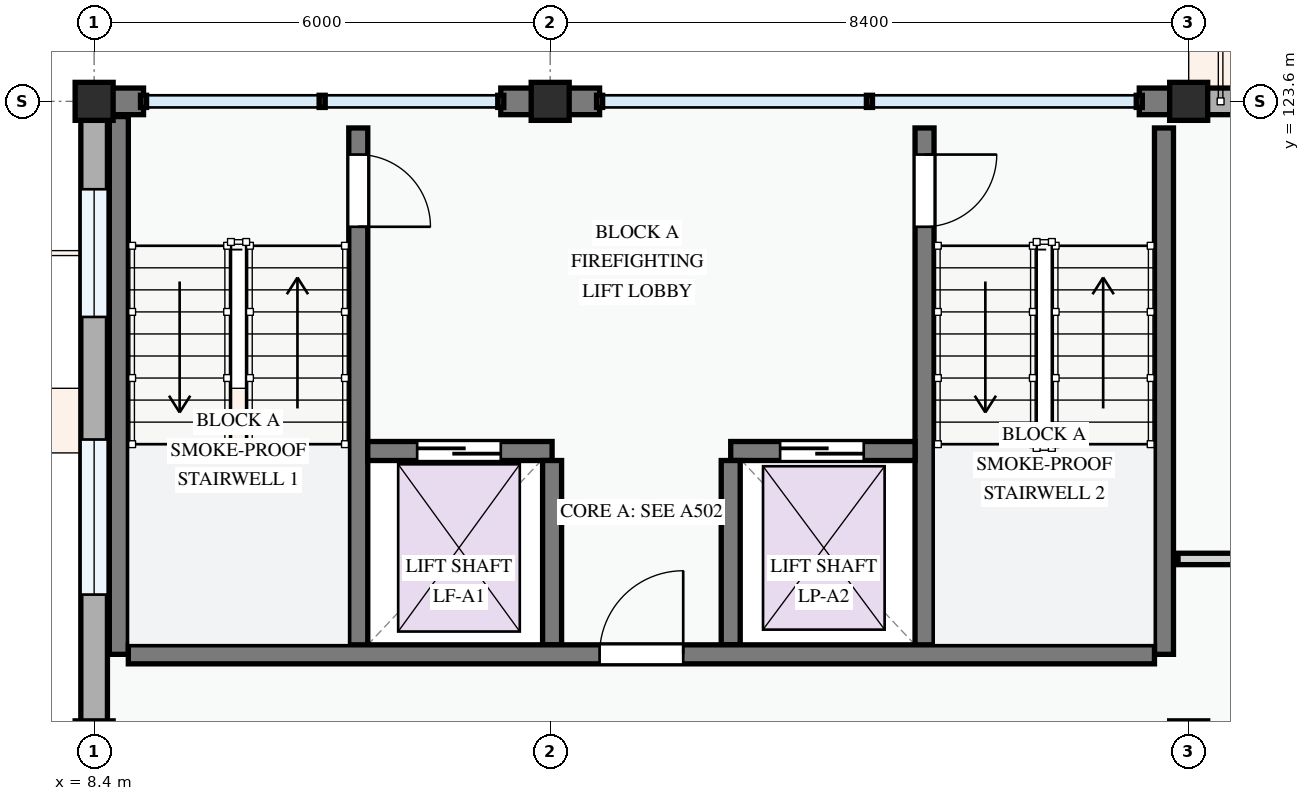
"""IFC4 building model, lengths in metres.
Left out: names, types, materials, properties, quantities, classifications, styles, units other than length and angle.
Written with IfcOpenShell. Run it as: python <this file> out.ifc"""

import sys

from ifc_helpers import new_model, si_unit, direction, frame, frame_2d, origin, origin_2d, place, context, subcontext, project, spatial, rectangle, extrude, element, fill, save


model = new_model("IFC4")
c1 = context("Model", 3, precision=1e-05, world=origin(), true_north=direction((0.0, 1.0)))
c2 = subcontext(c1, "Body", "Model", "MODEL_VIEW")
j1 = project(units=[si_unit("LENGTHUNIT", "METRE"), si_unit("PLANEANGLEUNIT", "RADIAN")], contexts=[c1])
p1 = place(None, origin())
s1 = spatial("IfcSite", under=j1, at=p1, CompositionType="ELEMENT")
p2 = place(p1, origin())
s2 = spatial("IfcBuilding", under=s1, at=p2, CompositionType="ELEMENT")
p3 = place(p2, frame((0.0, 0.0, 47.7)))
s3 = spatial("IfcBuildingStorey", under=s2, at=p3, CompositionType="ELEMENT", Elevation=47.7)
for number, where, z_axis, x_axis in (
    (1, (8.4, 123.6, 0.0), (0.0, 0.0, 1.0), (1.0, 0.0, 0.0)),
    (2, (14.4, 123.6, 0.0), (0.0, 0.0, 1.0), (1.0, 0.0, 0.0)),
    (3, (22.8, 123.6, 0.0), (0.0, 0.0, 1.0), (1.0, 0.0, 0.0)),
):
    element("IfcColumn", number, at=place(p3, frame(where, z_axis=z_axis, x_axis=x_axis)), inside=s3, PredefinedType="COLUMN", context=c2, shape_type="SweptSolid", body=[
        extrude(rectangle(XDim=0.5, YDim=0.5, at=origin_2d()), origin(), (0.0, 0.0, 1.0), 3.3),
    ])
p4 = place(p3, frame((28.8, 123.6, 0.0), z_axis=(0.0, 0.0, 1.0), x_axis=(-1.0, 0.0, 0.0)))
e4 = element("IfcWall", 4, at=p4, inside=s3, PredefinedType="STANDARD", context=c2, shape_type="SweptSolid", body=[
    extrude(rectangle(XDim=6.0, YDim=0.35, at=frame_2d((3.0, 0.0))), origin(), (0.0, 0.0, 1.0), 2.525),
])
p5 = place(p4, frame((0.62, 0.0, 0.0)))
e5 = element("IfcOpeningElement", 5, at=p5, cuts=e4, PredefinedType="OPENING", context=c2, shape_type="SweptSolid", body=[
    extrude(rectangle(XDim=1.1, YDim=2.15, at=frame_2d((0.55, 1.075))), frame((0.0, 0.185, 0.0), z_axis=(0.0, -1.0, 0.0), x_axis=(1.0, 0.0, 0.0)), (0.0, 0.0, 1.0), 0.37),
])
p6 = place(p4, frame((3.04, 0.0, 0.78)))
e6 = element("IfcOpeningElement", 6, at=p6, cuts=e4, PredefinedType="OPENING", context=c2, shape_type="SweptSolid", body=[
    extrude(rectangle(XDim=1.5, YDim=1.5, at=frame_2d((0.75, 0.75))), frame((0.0, 0.185, 0.0), z_axis=(0.0, -1.0, 0.0), x_axis=(1.0, 0.0, 0.0)), (0.0, 0.0, 1.0), 0.37),
])
for number, where, z_axis, x_axis in (
    (7, (22.8, 123.6, 0.0), (0.0, 0.0, 1.0), (-1.0, 0.0, 0.0)),
    (8, (15.05, 123.6, 0.0), (0.0, 0.0, 1.0), (-1.0, 0.0, 0.0)),
):
    element("IfcWall", number, at=place(p3, frame(where, z_axis=z_axis, x_axis=x_axis)), inside=s3, PredefinedType="STANDARD", context=c2, shape_type="SweptSolid", body=[
        extrude(rectangle(XDim=0.65, YDim=0.35, at=frame_2d((0.325, 0.0))), origin(), (0.0, 0.0, 1.0), 3.04),
    ])
p7 = place(p3, frame((14.4, 123.6, 0.0), z_axis=(0.0, 0.0, 1.0), x_axis=(-1.0, 0.0, 0.0)))
e9 = element("IfcWall", 9, at=p7, inside=s3, PredefinedType="STANDARD", context=c2, shape_type="SweptSolid", body=[
    extrude(rectangle(XDim=0.65, YDim=0.35, at=frame_2d((0.325, 0.0))), origin(), (0.0, 0.0, 1.0), 3.04),
])
p8 = place(p3, frame((9.05, 123.6, 0.0), z_axis=(0.0, 0.0, 1.0), x_axis=(-1.0, 0.0, 0.0)))
e10 = element("IfcWall", 10, at=p8, inside=s3, PredefinedType="STANDARD", context=c2, shape_type="SweptSolid", body=[
    extrude(rectangle(XDim=0.473, YDim=0.35, at=frame_2d((0.237, 0.0))), origin(), (0.0, 0.0, 1.0), 3.04),
])
p9 = place(p3, frame((8.4, 123.6, 0.0), z_axis=(0.0, 0.0, 1.0), x_axis=(0.0, -1.0, 0.0)))
e11 = element("IfcWall", 11, at=p9, inside=s3, PredefinedType="STANDARD", context=c2, shape_type="SweptSolid", body=[
    extrude(rectangle(XDim=8.4, YDim=0.35, at=frame_2d((4.2, 0.0))), origin(), (0.0, 0.0, 1.0), 2.425),
])
p10 = place(p9, frame((1.156, 0.0, 0.78)))
e12 = element("IfcOpeningElement", 12, at=p10, cuts=e11, PredefinedType="OPENING", context=c2, shape_type="SweptSolid", body=[
    extrude(rectangle(XDim=1.68, YDim=1.46, at=frame_2d((0.84, 0.73))), frame((0.0, 0.185, 0.0), z_axis=(0.0, -1.0, 0.0), x_axis=(1.0, 0.0, 0.0)), (0.0, 0.0, 1.0), 0.37),
])
p11 = place(p9, frame((4.449, 0.0, 0.78)))
e13 = element("IfcOpeningElement", 13, at=p11, cuts=e11, PredefinedType="OPENING", context=c2, shape_type="SweptSolid", body=[
    extrude(rectangle(XDim=2.04, YDim=1.46, at=frame_2d((1.02, 0.73))), frame((0.0, 0.185, 0.0), z_axis=(0.0, -1.0, 0.0), x_axis=(1.0, 0.0, 0.0)), (0.0, 0.0, 1.0), 0.37),
])
p12 = place(p3, frame((11.875, 123.25, 0.0), z_axis=(0.0, 0.0, 1.0), x_axis=(0.0, -1.0, 0.0)))
e14 = element("IfcWall", 14, at=p12, inside=s3, PredefinedType="SHEAR", context=c2, shape_type="SweptSolid", body=[
    extrude(rectangle(XDim=6.925, YDim=0.25, at=frame_2d((3.462, 0.0))), origin(), (0.0, 0.0, 1.0), 3.0),
])
p13 = place(p12, frame((0.35, 0.0, 0.0)))
e15 = element("IfcOpeningElement", 15, at=p13, cuts=e14, PredefinedType="OPENING", context=c2, shape_type="SweptSolid", body=[
    extrude(rectangle(XDim=0.95, YDim=2.1, at=frame_2d((0.475, 1.05))), frame((0.0, 0.135, 0.0), z_axis=(0.0, -1.0, 0.0), x_axis=(1.0, 0.0, 0.0)), (0.0, 0.0, 1.0), 0.27),
])
p14 = place(p3, frame((8.725, 123.4, 0.0), z_axis=(0.0, 0.0, 1.0), x_axis=(0.0, -1.0, 0.0)))
e16 = element("IfcWall", 16, at=p14, inside=s3, PredefinedType="SHEAR", context=c2, shape_type="SweptSolid", body=[
    extrude(rectangle(XDim=7.075, YDim=0.25, at=frame_2d((3.538, 0.0))), origin(), (0.0, 0.0, 1.0), 3.0),
])
p15 = place(p3, frame((22.475, 123.25, 0.0), z_axis=(0.0, 0.0, 1.0), x_axis=(0.0, -1.0, 0.0)))
e17 = element("IfcWall", 17, at=p15, inside=s3, PredefinedType="SHEAR", context=c2, shape_type="SweptSolid", body=[
    extrude(rectangle(XDim=6.925, YDim=0.25, at=frame_2d((3.462, 0.0))), origin(), (0.0, 0.0, 1.0), 3.0),
])
p16 = place(p3, frame((19.325, 123.25, 0.0), z_axis=(0.0, 0.0, 1.0), x_axis=(0.0, -1.0, 0.0)))
e18 = element("IfcWall", 18, at=p16, inside=s3, PredefinedType="SHEAR", context=c2, shape_type="SweptSolid", body=[
    extrude(rectangle(XDim=6.925, YDim=0.25, at=frame_2d((3.462, 0.0))), origin(), (0.0, 0.0, 1.0), 3.0),
])
p17 = place(p16, frame((0.35, 0.0, 0.0)))
e19 = element("IfcOpeningElement", 19, at=p17, cuts=e18, PredefinedType="OPENING", context=c2, shape_type="SweptSolid", body=[
    extrude(rectangle(XDim=0.95, YDim=2.1, at=frame_2d((0.475, 1.05))), frame((0.0, 0.135, 0.0), z_axis=(0.0, -1.0, 0.0), x_axis=(1.0, 0.0, 0.0)), (0.0, 0.0, 1.0), 0.27),
])
p18 = place(p3, frame((12.0, 119.0, 0.0), z_axis=(0.0, 0.0, 1.0), x_axis=(1.0, 0.0, 0.0)))
e20 = element("IfcWall", 20, at=p18, inside=s3, PredefinedType="SHEAR", context=c2, shape_type="SweptSolid", body=[
    extrude(rectangle(XDim=2.425, YDim=0.25, at=frame_2d((1.212, 0.0))), origin(), (0.0, 0.0, 1.0), 3.0),
])
p19 = place(p18, frame((0.65, 0.0, 0.0)))
e21 = element("IfcOpeningElement", 21, at=p19, cuts=e20, PredefinedType="OPENING", context=c2, shape_type="SweptSolid", body=[
    extrude(rectangle(XDim=1.1, YDim=2.15, at=frame_2d((0.55, 1.075))), frame((0.0, 0.135, 0.0), z_axis=(0.0, -1.0, 0.0), x_axis=(1.0, 0.0, 0.0)), (0.0, 0.0, 1.0), 0.27),
])
p20 = place(p3, frame((16.775, 119.0, 0.0), z_axis=(0.0, 0.0, 1.0), x_axis=(1.0, 0.0, 0.0)))
e22 = element("IfcWall", 22, at=p20, inside=s3, PredefinedType="SHEAR", context=c2, shape_type="SweptSolid", body=[
    extrude(rectangle(XDim=2.425, YDim=0.25, at=frame_2d((1.212, 0.0))), origin(), (0.0, 0.0, 1.0), 3.0),
])
p21 = place(p20, frame((0.65, 0.0, 0.0)))
e23 = element("IfcOpeningElement", 23, at=p21, cuts=e22, PredefinedType="OPENING", context=c2, shape_type="SweptSolid", body=[
    extrude(rectangle(XDim=1.1, YDim=2.15, at=frame_2d((0.55, 1.075))), frame((0.0, 0.135, 0.0), z_axis=(0.0, -1.0, 0.0), x_axis=(1.0, 0.0, 0.0)), (0.0, 0.0, 1.0), 0.27),
])
for number, where, z_axis, x_axis in (
    (24, (14.425, 118.875, 0.0), (0.0, 0.0, 1.0), (0.0, -1.0, 0.0)),
    (25, (16.775, 118.875, 0.0), (0.0, 0.0, 1.0), (0.0, -1.0, 0.0)),
):
    element("IfcWall", number, at=place(p3, frame(where, z_axis=z_axis, x_axis=x_axis)), inside=s3, PredefinedType="SHEAR", context=c2, shape_type="SweptSolid", body=[
        extrude(rectangle(XDim=2.425, YDim=0.25, at=frame_2d((1.212, 0.0))), origin(), (0.0, 0.0, 1.0), 3.0),
    ])
p22 = place(p3, frame((8.85, 116.325, 0.0), z_axis=(0.0, 0.0, 1.0), x_axis=(1.0, 0.0, 0.0)))
e26 = element("IfcWall", 26, at=p22, inside=s3, PredefinedType="SHEAR", context=c2, shape_type="SweptSolid", body=[
    extrude(rectangle(XDim=13.5, YDim=0.25, at=frame_2d((6.75, 0.0))), origin(), (0.0, 0.0, 1.0), 3.0),
])
p23 = place(p22, frame((6.2, 0.0, 0.0)))
e27 = element("IfcOpeningElement", 27, at=p23, cuts=e26, PredefinedType="OPENING", context=c2, shape_type="SweptSolid", body=[
    extrude(rectangle(XDim=1.1, YDim=2.15, at=frame_2d((0.55, 1.075))), frame((0.0, 0.135, 0.0), z_axis=(0.0, -1.0, 0.0), x_axis=(1.0, 0.0, 0.0)), (0.0, 0.0, 1.0), 0.27),
])
p24 = place(p3, frame((22.66, 117.58, 0.0), z_axis=(0.0, 0.0, 1.0), x_axis=(1.0, 0.0, 0.0)))
e28 = element("IfcWall", 28, at=p24, inside=s3, PredefinedType="PARTITIONING", context=c2, shape_type="SweptSolid", body=[
    extrude(rectangle(XDim=14.363, YDim=0.15, at=frame_2d((7.182, 0.0))), origin(), (0.0, 0.0, 1.0), 3.0),
])
p25 = place(p24, frame((2.74, 0.0, 0.0)))
e29 = element("IfcOpeningElement", 29, at=p25, cuts=e28, PredefinedType="OPENING", context=c2, shape_type="SweptSolid", body=[
    extrude(rectangle(XDim=0.92, YDim=2.1, at=frame_2d((0.46, 1.05))), frame((0.0, 0.085, 0.0), z_axis=(0.0, -1.0, 0.0), x_axis=(1.0, 0.0, 0.0)), (0.0, 0.0, 1.0), 0.17),
])
p26 = place(p10, origin())
e30 = element("IfcWindow", 30, at=p26, inside=s3, PartitioningType="DOUBLE_PANEL_VERTICAL", PredefinedType="WINDOW", context=c2, shape_type="SweptSolid", body=[
    extrude(rectangle(XDim=1.68, YDim=1.46, at=frame_2d((0.84, 0.73))), frame((0.0, 0.03, 0.0), z_axis=(0.0, -1.0, 0.0), x_axis=(1.0, 0.0, 0.0)), (0.0, 0.0, 1.0), 0.06),
])
fill(e12, e30)
p27 = place(p11, origin())
e31 = element("IfcWindow", 31, at=p27, inside=s3, PartitioningType="DOUBLE_PANEL_VERTICAL", PredefinedType="WINDOW", context=c2, shape_type="SweptSolid", body=[
    extrude(rectangle(XDim=2.04, YDim=1.46, at=frame_2d((1.02, 0.73))), frame((0.0, 0.03, 0.0), z_axis=(0.0, -1.0, 0.0), x_axis=(1.0, 0.0, 0.0)), (0.0, 0.0, 1.0), 0.06),
])
fill(e13, e31)
p28 = place(p13, origin())
e32 = element("IfcDoor", 32, at=p28, inside=s3, OperationType="SINGLE_SWING_RIGHT", PredefinedType="DOOR", context=c2, shape_type="SweptSolid", body=[
    extrude(rectangle(XDim=0.95, YDim=2.1, at=frame_2d((0.475, 1.05))), frame((0.0, 0.025, 0.0), z_axis=(0.0, -1.0, 0.0), x_axis=(1.0, 0.0, 0.0)), (0.0, 0.0, 1.0), 0.05),
])
fill(e15, e32)
p29 = place(p17, origin())
e33 = element("IfcDoor", 33, at=p29, inside=s3, OperationType="SINGLE_SWING_LEFT", PredefinedType="DOOR", context=c2, shape_type="SweptSolid", body=[
    extrude(rectangle(XDim=0.95, YDim=2.1, at=frame_2d((0.475, 1.05))), frame((0.0, 0.025, 0.0), z_axis=(0.0, -1.0, 0.0), x_axis=(1.0, 0.0, 0.0)), (0.0, 0.0, 1.0), 0.05),
])
fill(e19, e33)
p30 = place(p19, origin())
e34 = element("IfcDoor", 34, at=p30, inside=s3, OperationType="SLIDING_TO_LEFT", PredefinedType="DOOR", context=c2, shape_type="SweptSolid", body=[
    extrude(rectangle(XDim=1.1, YDim=2.15, at=frame_2d((0.55, 1.075))), frame((0.0, 0.025, 0.0), z_axis=(0.0, -1.0, 0.0), x_axis=(1.0, 0.0, 0.0)), (0.0, 0.0, 1.0), 0.05),
])
fill(e21, e34)
p31 = place(p21, origin())
e35 = element("IfcDoor", 35, at=p31, inside=s3, OperationType="SLIDING_TO_LEFT", PredefinedType="DOOR", context=c2, shape_type="SweptSolid", body=[
    extrude(rectangle(XDim=1.1, YDim=2.15, at=frame_2d((0.55, 1.075))), frame((0.0, 0.025, 0.0), z_axis=(0.0, -1.0, 0.0), x_axis=(1.0, 0.0, 0.0)), (0.0, 0.0, 1.0), 0.05),
])
fill(e23, e35)
p32 = place(p23, origin())
e36 = element("IfcDoor", 36, at=p32, inside=s3, OperationType="SINGLE_SWING_RIGHT", PredefinedType="DOOR", context=c2, shape_type="SweptSolid", body=[
    extrude(rectangle(XDim=1.1, YDim=2.15, at=frame_2d((0.55, 1.075))), frame((0.0, 0.025, 0.0), z_axis=(0.0, -1.0, 0.0), x_axis=(1.0, 0.0, 0.0)), (0.0, 0.0, 1.0), 0.05),
])
fill(e27, e36)
save(model, sys.argv[1])
